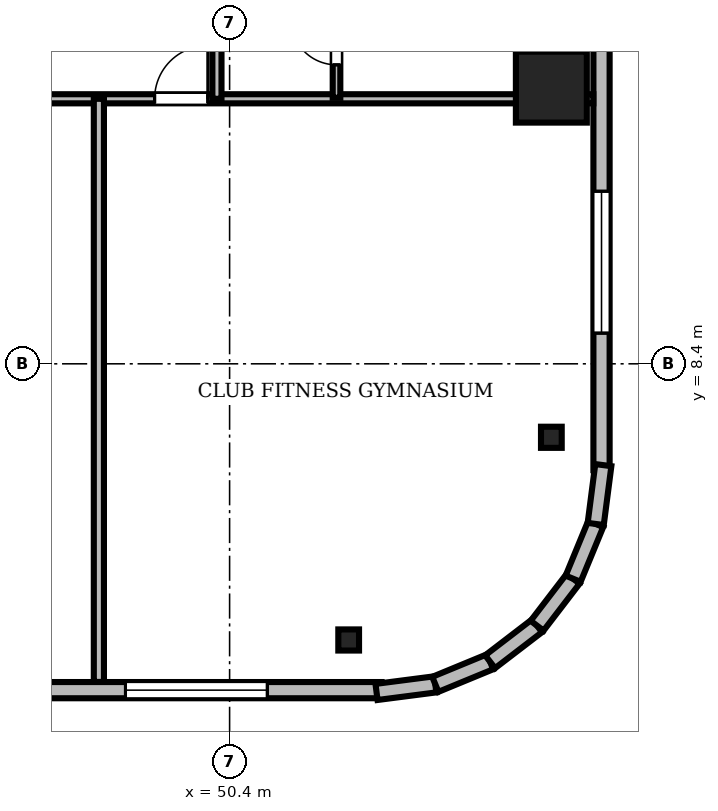
"""IFC4 building model, lengths in metres.
Left out: names, types, materials, properties, quantities, classifications, styles, units other than length and angle.
Written with IfcOpenShell. Run it as: python <this file> out.ifc"""

import sys

from ifc_helpers import new_model, si_unit, direction, frame, frame_2d, origin, origin_2d, place, context, subcontext, project, spatial, rectangle, i_section, extrude, source, transform, mapped, element, fill, save


model = new_model("IFC4")
c1 = context("Model", 3, precision=1e-05, world=origin(), true_north=direction((0.0, 1.0)))
c2 = subcontext(c1, "Body", "Model", "MODEL_VIEW")
j1 = project(units=[si_unit("LENGTHUNIT", "METRE"), si_unit("PLANEANGLEUNIT", "RADIAN")], contexts=[c1])
p1 = place(None, origin())
s1 = spatial("IfcSite", under=j1, at=p1, CompositionType="ELEMENT")
p2 = place(p1, origin())
s2 = spatial("IfcBuilding", under=s1, at=p2, CompositionType="ELEMENT")
p3 = place(p2, frame((0.0, 0.0, 226.05)))
s3 = spatial("IfcBuildingStorey", under=s2, at=p3, CompositionType="ELEMENT", Elevation=226.05)
m1 = source(origin(), c2, "Body", "SweptSolid", [
    extrude(rectangle(XDim=1.4, YDim=1.4, at=origin_2d()), origin(), (0.0, 0.0, 1.0), 3.53),
])
p4 = place(p3, frame((56.75, 13.86, 0.0), z_axis=(0.0, 0.0, 1.0), x_axis=(1.0, 0.0, 0.0)))
e1 = element("IfcColumn", 1, at=p4, inside=s3, PredefinedType="COLUMN", context=c2, shape_type="MappedRepresentation", body=[
    mapped(m1, transform((0.0, 0.0, 0.0), scale=1.0)),
])
m2 = source(origin(), c2, "Body", "SweptSolid", [
    extrude(i_section(OverallWidth=0.409, OverallDepth=0.417, WebThickness=0.021, FlangeThickness=0.033, FilletRadius=0.015, at=origin_2d()), origin(), (0.0, 0.0, 1.0), 3.53),
])
for number, where, z_axis, x_axis in (
    (2, (52.75, 2.95, 0.0), (0.0, 0.0, 1.0), (1.0, 0.0, 0.0)),
    (3, (56.75, 6.95, 0.0), (0.0, 0.0, 1.0), (1.0, 0.0, 0.0)),
):
    element("IfcColumn", number, at=place(p3, frame(where, z_axis=z_axis, x_axis=x_axis)), inside=s3, PredefinedType="COLUMN", context=c2, shape_type="MappedRepresentation", body=[
        mapped(m2, transform((0.0, 0.0, 0.0), scale=1.0)),
    ])
m3 = source(origin(), c2, "Body", "SweptSolid", [
    extrude(rectangle(XDim=15.6, YDim=0.32, at=frame_2d((7.8, 0.0))), origin(), (0.0, 0.0, 1.0), 3.53),
])
p5 = place(p3, frame((37.8, 1.96, 0.0), z_axis=(0.0, 0.0, 1.0), x_axis=(1.0, 0.0, 0.0)))
e4 = element("IfcWall", 4, at=p5, inside=s3, PredefinedType="SOLIDWALL", context=c2, shape_type="MappedRepresentation", body=[
    mapped(m3, transform((0.0, 0.0, 0.0), scale=1.0)),
])
m4 = source(origin(), c2, "Body", "SweptSolid", [
    extrude(rectangle(XDim=2.8, YDim=2.4, at=frame_2d((1.4, 1.2))), frame((0.0, 0.17, 0.0), z_axis=(0.0, -1.0, 0.0), x_axis=(1.0, 0.0, 0.0)), (0.0, 0.0, 1.0), 0.34),
])
p6 = place(p5, frame((10.545, 0.0, 0.72)))
e5 = element("IfcOpeningElement", 5, at=p6, cuts=e4, PredefinedType="OPENING", context=c2, shape_type="MappedRepresentation", body=[
    mapped(m4, transform((0.0, 0.0, 0.0), scale=1.0)),
])
p7 = place(p3, frame((57.74, 6.3, 0.0), z_axis=(0.0, 0.0, 1.0), x_axis=(0.0, 1.0, 0.0)))
e6 = element("IfcWall", 6, at=p7, inside=s3, PredefinedType="SOLIDWALL", context=c2, shape_type="MappedRepresentation", body=[
    mapped(m3, transform((0.0, 0.0, 0.0), scale=1.0)),
])
m5 = source(origin(), c2, "Body", "SweptSolid", [
    extrude(rectangle(XDim=1.4, YDim=2.3, at=frame_2d((0.7, 1.15))), frame((0.0, 0.17, 0.0), z_axis=(0.0, -1.0, 0.0), x_axis=(1.0, 0.0, 0.0)), (0.0, 0.0, 1.0), 0.34),
])
p8 = place(p7, frame((9.61, 0.0, 0.0)))
e7 = element("IfcOpeningElement", 7, at=p8, cuts=e6, PredefinedType="OPENING", context=c2, shape_type="MappedRepresentation", body=[
    mapped(m5, transform((0.0, 0.0, 0.0), scale=1.0)),
])
p9 = place(p7, frame((2.705, 0.0, 0.72)))
e8 = element("IfcOpeningElement", 8, at=p9, cuts=e6, PredefinedType="OPENING", context=c2, shape_type="MappedRepresentation", body=[
    mapped(m4, transform((0.0, 0.0, 0.0), scale=1.0)),
])
m6 = source(origin(), c2, "Body", "SweptSolid", [
    extrude(rectangle(XDim=1.17, YDim=0.32, at=frame_2d((0.585, 0.0))), origin(), (0.0, 0.0, 1.0), 3.53),
])
p10 = place(p3, frame((53.3, 1.925, 0.0), z_axis=(0.0, 0.0, 1.0), x_axis=(0.991762485493, 0.128090485085, 0.0)))
e9 = element("IfcWall", 9, at=p10, inside=s3, PredefinedType="SOLIDWALL", context=c2, shape_type="MappedRepresentation", body=[
    mapped(m6, transform((0.0, 0.0, 0.0), scale=1.0)),
])
m7 = source(origin(), c2, "Body", "SweptSolid", [
    extrude(rectangle(XDim=1.169, YDim=0.32, at=frame_2d((0.585, 0.0))), origin(), (0.0, 0.0, 1.0), 3.53),
])
p11 = place(p3, frame((54.46, 2.074, 0.0), z_axis=(0.0, 0.0, 1.0), x_axis=(0.924479075121, 0.381232789334, 0.0)))
e10 = element("IfcWall", 10, at=p11, inside=s3, PredefinedType="SOLIDWALL", context=c2, shape_type="MappedRepresentation", body=[
    mapped(m7, transform((0.0, 0.0, 0.0), scale=1.0)),
])
m8 = source(origin(), c2, "Body", "SweptSolid", [
    extrude(rectangle(XDim=1.169, YDim=0.32, at=frame_2d((0.584, 0.0))), origin(), (0.0, 0.0, 1.0), 3.53),
])
p12 = place(p3, frame((55.541, 2.52, 0.0), z_axis=(0.0, 0.0, 1.0), x_axis=(0.793663520347, 0.608356981114, 0.0)))
e11 = element("IfcWall", 11, at=p12, inside=s3, PredefinedType="SOLIDWALL", context=c2, shape_type="MappedRepresentation", body=[
    mapped(m8, transform((0.0, 0.0, 0.0), scale=1.0)),
])
m9 = source(origin(), c2, "Body", "SweptSolid", [
    extrude(rectangle(XDim=1.169, YDim=0.32, at=frame_2d((0.584, 0.0))), origin(), (0.0, 0.0, 1.0), 3.53),
])
for number, where, z_axis, x_axis in (
    (12, (56.469, 3.231, 0.0), (0.0, 0.0, 1.0), (0.608, 0.794, 0.0)),
    (13, (57.18, 4.159, 0.0), (0.0, 0.0, 1.0), (0.381, 0.925, 0.0)),
):
    element("IfcWall", number, at=place(p3, frame(where, z_axis=z_axis, x_axis=x_axis)), inside=s3, PredefinedType="SOLIDWALL", context=c2, shape_type="MappedRepresentation", body=[
        mapped(m9, transform((0.0, 0.0, 0.0), scale=1.0)),
    ])
m10 = source(origin(), c2, "Body", "SweptSolid", [
    extrude(rectangle(XDim=1.171, YDim=0.32, at=frame_2d((0.585, 0.0))), origin(), (0.0, 0.0, 1.0), 3.53),
])
p13 = place(p3, frame((57.625, 5.24, 0.0), z_axis=(0.0, 0.0, 1.0), x_axis=(0.128269133229, 0.991739395941, 0.0)))
e14 = element("IfcWall", 14, at=p13, inside=s3, PredefinedType="SOLIDWALL", context=c2, shape_type="MappedRepresentation", body=[
    mapped(m10, transform((0.0, 0.0, 0.0), scale=1.0)),
])
m11 = source(origin(), c2, "Body", "SweptSolid", [
    extrude(rectangle(XDim=46.156, YDim=0.18, at=frame_2d((23.078, 0.0))), origin(), (0.0, 0.0, 1.0), 2.772),
])
p14 = place(p3, frame((11.422, 13.63, 0.0), z_axis=(0.0, 0.0, 1.0), x_axis=(1.0, 0.0, 0.0)))
e15 = element("IfcWall", 15, at=p14, inside=s3, PredefinedType="PARTITIONING", context=c2, shape_type="MappedRepresentation", body=[
    mapped(m11, transform((0.0, 0.0, 0.0), scale=1.0)),
])
m12 = source(origin(), c2, "Body", "SweptSolid", [
    extrude(rectangle(XDim=1.05, YDim=2.2, at=frame_2d((0.525, 1.1))), frame((0.0, 0.1, 0.0), z_axis=(0.0, -1.0, 0.0), x_axis=(1.0, 0.0, 0.0)), (0.0, 0.0, 1.0), 0.2),
])
p15 = place(p14, frame((14.338, 0.0, 0.0)))
e16 = element("IfcOpeningElement", 16, at=p15, cuts=e15, PredefinedType="OPENING", context=c2, shape_type="MappedRepresentation", body=[
    mapped(m12, transform((0.0, 0.0, 0.0), scale=1.0)),
])
p16 = place(p14, frame((17.059, 0.0, 0.0)))
e17 = element("IfcOpeningElement", 17, at=p16, cuts=e15, PredefinedType="OPENING", context=c2, shape_type="MappedRepresentation", body=[
    mapped(m12, transform((0.0, 0.0, 0.0), scale=1.0)),
])
p17 = place(p14, frame((21.772, 0.0, 0.0)))
e18 = element("IfcOpeningElement", 18, at=p17, cuts=e15, PredefinedType="OPENING", context=c2, shape_type="MappedRepresentation", body=[
    mapped(m12, transform((0.0, 0.0, 0.0), scale=1.0)),
])
p18 = place(p14, frame((27.414, 0.0, 0.0)))
e19 = element("IfcOpeningElement", 19, at=p18, cuts=e15, PredefinedType="OPENING", context=c2, shape_type="MappedRepresentation", body=[
    mapped(m12, transform((0.0, 0.0, 0.0), scale=1.0)),
])
p19 = place(p14, frame((33.057, 0.0, 0.0)))
e20 = element("IfcOpeningElement", 20, at=p19, cuts=e15, PredefinedType="OPENING", context=c2, shape_type="MappedRepresentation", body=[
    mapped(m12, transform((0.0, 0.0, 0.0), scale=1.0)),
])
p20 = place(p14, frame((37.498, 0.0, 0.0)))
e21 = element("IfcOpeningElement", 21, at=p20, cuts=e15, PredefinedType="OPENING", context=c2, shape_type="MappedRepresentation", body=[
    mapped(m12, transform((0.0, 0.0, 0.0), scale=1.0)),
])
m13 = source(origin(), c2, "Body", "SweptSolid", [
    extrude(rectangle(XDim=27.47, YDim=0.18, at=frame_2d((13.735, 0.0))), origin(), (0.0, 0.0, 1.0), 2.972),
])
p21 = place(p3, frame((50.15, 13.63, 0.0), z_axis=(0.0, 0.0, 1.0), x_axis=(0.0, 1.0, 0.0)))
e22 = element("IfcWall", 22, at=p21, inside=s3, PredefinedType="PARTITIONING", context=c2, shape_type="MappedRepresentation", body=[
    mapped(m13, transform((0.0, 0.0, 0.0), scale=1.0)),
])
p22 = place(p21, frame((4.071, 0.0, 0.0)))
e23 = element("IfcOpeningElement", 23, at=p22, cuts=e22, PredefinedType="OPENING", context=c2, shape_type="MappedRepresentation", body=[
    mapped(m12, transform((0.0, 0.0, 0.0), scale=1.0)),
])
p23 = place(p21, frame((10.884, 0.0, 0.0)))
e24 = element("IfcOpeningElement", 24, at=p23, cuts=e22, PredefinedType="OPENING", context=c2, shape_type="MappedRepresentation", body=[
    mapped(m12, transform((0.0, 0.0, 0.0), scale=1.0)),
])
p24 = place(p21, frame((17.696, 0.0, 0.0)))
e25 = element("IfcOpeningElement", 25, at=p24, cuts=e22, PredefinedType="OPENING", context=c2, shape_type="MappedRepresentation", body=[
    mapped(m12, transform((0.0, 0.0, 0.0), scale=1.0)),
])
p25 = place(p21, frame((24.509, 0.0, 0.0)))
e26 = element("IfcOpeningElement", 26, at=p25, cuts=e22, PredefinedType="OPENING", context=c2, shape_type="MappedRepresentation", body=[
    mapped(m12, transform((0.0, 0.0, 0.0), scale=1.0)),
])
m14 = source(origin(), c2, "Body", "SweptSolid", [
    extrude(rectangle(XDim=2.29, YDim=0.15, at=frame_2d((1.145, 0.0))), origin(), (0.0, 0.0, 1.0), 2.972),
])
p26 = place(p3, frame((52.51, 13.65, 0.0), z_axis=(0.0, 0.0, 1.0), x_axis=(0.0, 1.0, 0.0)))
e27 = element("IfcWall", 27, at=p26, inside=s3, PredefinedType="PARTITIONING", context=c2, shape_type="MappedRepresentation", body=[
    mapped(m14, transform((0.0, 0.0, 0.0), scale=1.0)),
])
m15 = source(origin(), c2, "Body", "SweptSolid", [
    extrude(rectangle(XDim=0.9, YDim=2.1, at=frame_2d((0.45, 1.05))), frame((0.0, 0.085, 0.0), z_axis=(0.0, -1.0, 0.0), x_axis=(1.0, 0.0, 0.0)), (0.0, 0.0, 1.0), 0.17),
])
p27 = place(p26, frame((0.65, 0.0, 0.0)))
e28 = element("IfcOpeningElement", 28, at=p27, cuts=e27, PredefinedType="OPENING", context=c2, shape_type="MappedRepresentation", body=[
    mapped(m15, transform((0.0, 0.0, 0.0), scale=1.0)),
])
m16 = source(origin(), c2, "Body", "SweptSolid", [
    extrude(rectangle(XDim=11.508, YDim=0.2, at=frame_2d((5.754, 0.0))), origin(), (0.0, 0.0, 1.0), 2.772),
])
p28 = place(p3, frame((47.82, 2.122, 0.0), z_axis=(0.0, 0.0, 1.0), x_axis=(0.0, 1.0, 0.0)))
e29 = element("IfcWall", 29, at=p28, inside=s3, PredefinedType="PARTITIONING", context=c2, shape_type="MappedRepresentation", body=[
    mapped(m16, transform((0.0, 0.0, 0.0), scale=1.0)),
])
m17 = source(origin(), c2, "Body", "SweptSolid", [
    extrude(rectangle(XDim=2.8, YDim=2.4, at=frame_2d((1.4, 1.2))), frame((0.0, 0.03, 0.0), z_axis=(0.0, -1.0, 0.0), x_axis=(1.0, 0.0, 0.0)), (0.0, 0.0, 1.0), 0.06),
])
p29 = place(p6, origin())
e30 = element("IfcWindow", 30, at=p29, inside=s3, PartitioningType="SINGLE_PANEL", PredefinedType="WINDOW", context=c2, shape_type="MappedRepresentation", body=[
    mapped(m17, transform((0.0, 0.0, 0.0), scale=1.0)),
])
fill(e5, e30)
p30 = place(p9, origin())
e31 = element("IfcWindow", 31, at=p30, inside=s3, PartitioningType="SINGLE_PANEL", PredefinedType="WINDOW", context=c2, shape_type="MappedRepresentation", body=[
    mapped(m17, transform((0.0, 0.0, 0.0), scale=1.0)),
])
fill(e8, e31)
m18 = source(origin(), c2, "Body", "SweptSolid", [
    extrude(rectangle(XDim=1.05, YDim=2.2, at=frame_2d((0.525, 1.1))), frame((0.0, 0.025, 0.0), z_axis=(0.0, -1.0, 0.0), x_axis=(1.0, 0.0, 0.0)), (0.0, 0.0, 1.0), 0.05),
])
p31 = place(p20, origin())
e32 = element("IfcDoor", 32, at=p31, inside=s3, OperationType="SINGLE_SWING_RIGHT", PredefinedType="DOOR", context=c2, shape_type="MappedRepresentation", body=[
    mapped(m18, transform((0.0, 0.0, 0.0), scale=1.0)),
])
fill(e21, e32)
m19 = source(origin(), c2, "Body", "SweptSolid", [
    extrude(rectangle(XDim=0.9, YDim=2.1, at=frame_2d((0.45, 1.05))), frame((0.0, 0.025, 0.0), z_axis=(0.0, -1.0, 0.0), x_axis=(1.0, 0.0, 0.0)), (0.0, 0.0, 1.0), 0.05),
])
p32 = place(p27, origin())
e33 = element("IfcDoor", 33, at=p32, inside=s3, OperationType="SINGLE_SWING_RIGHT", PredefinedType="DOOR", context=c2, shape_type="MappedRepresentation", body=[
    mapped(m19, transform((0.0, 0.0, 0.0), scale=1.0)),
])
fill(e28, e33)
save(model, sys.argv[1])
